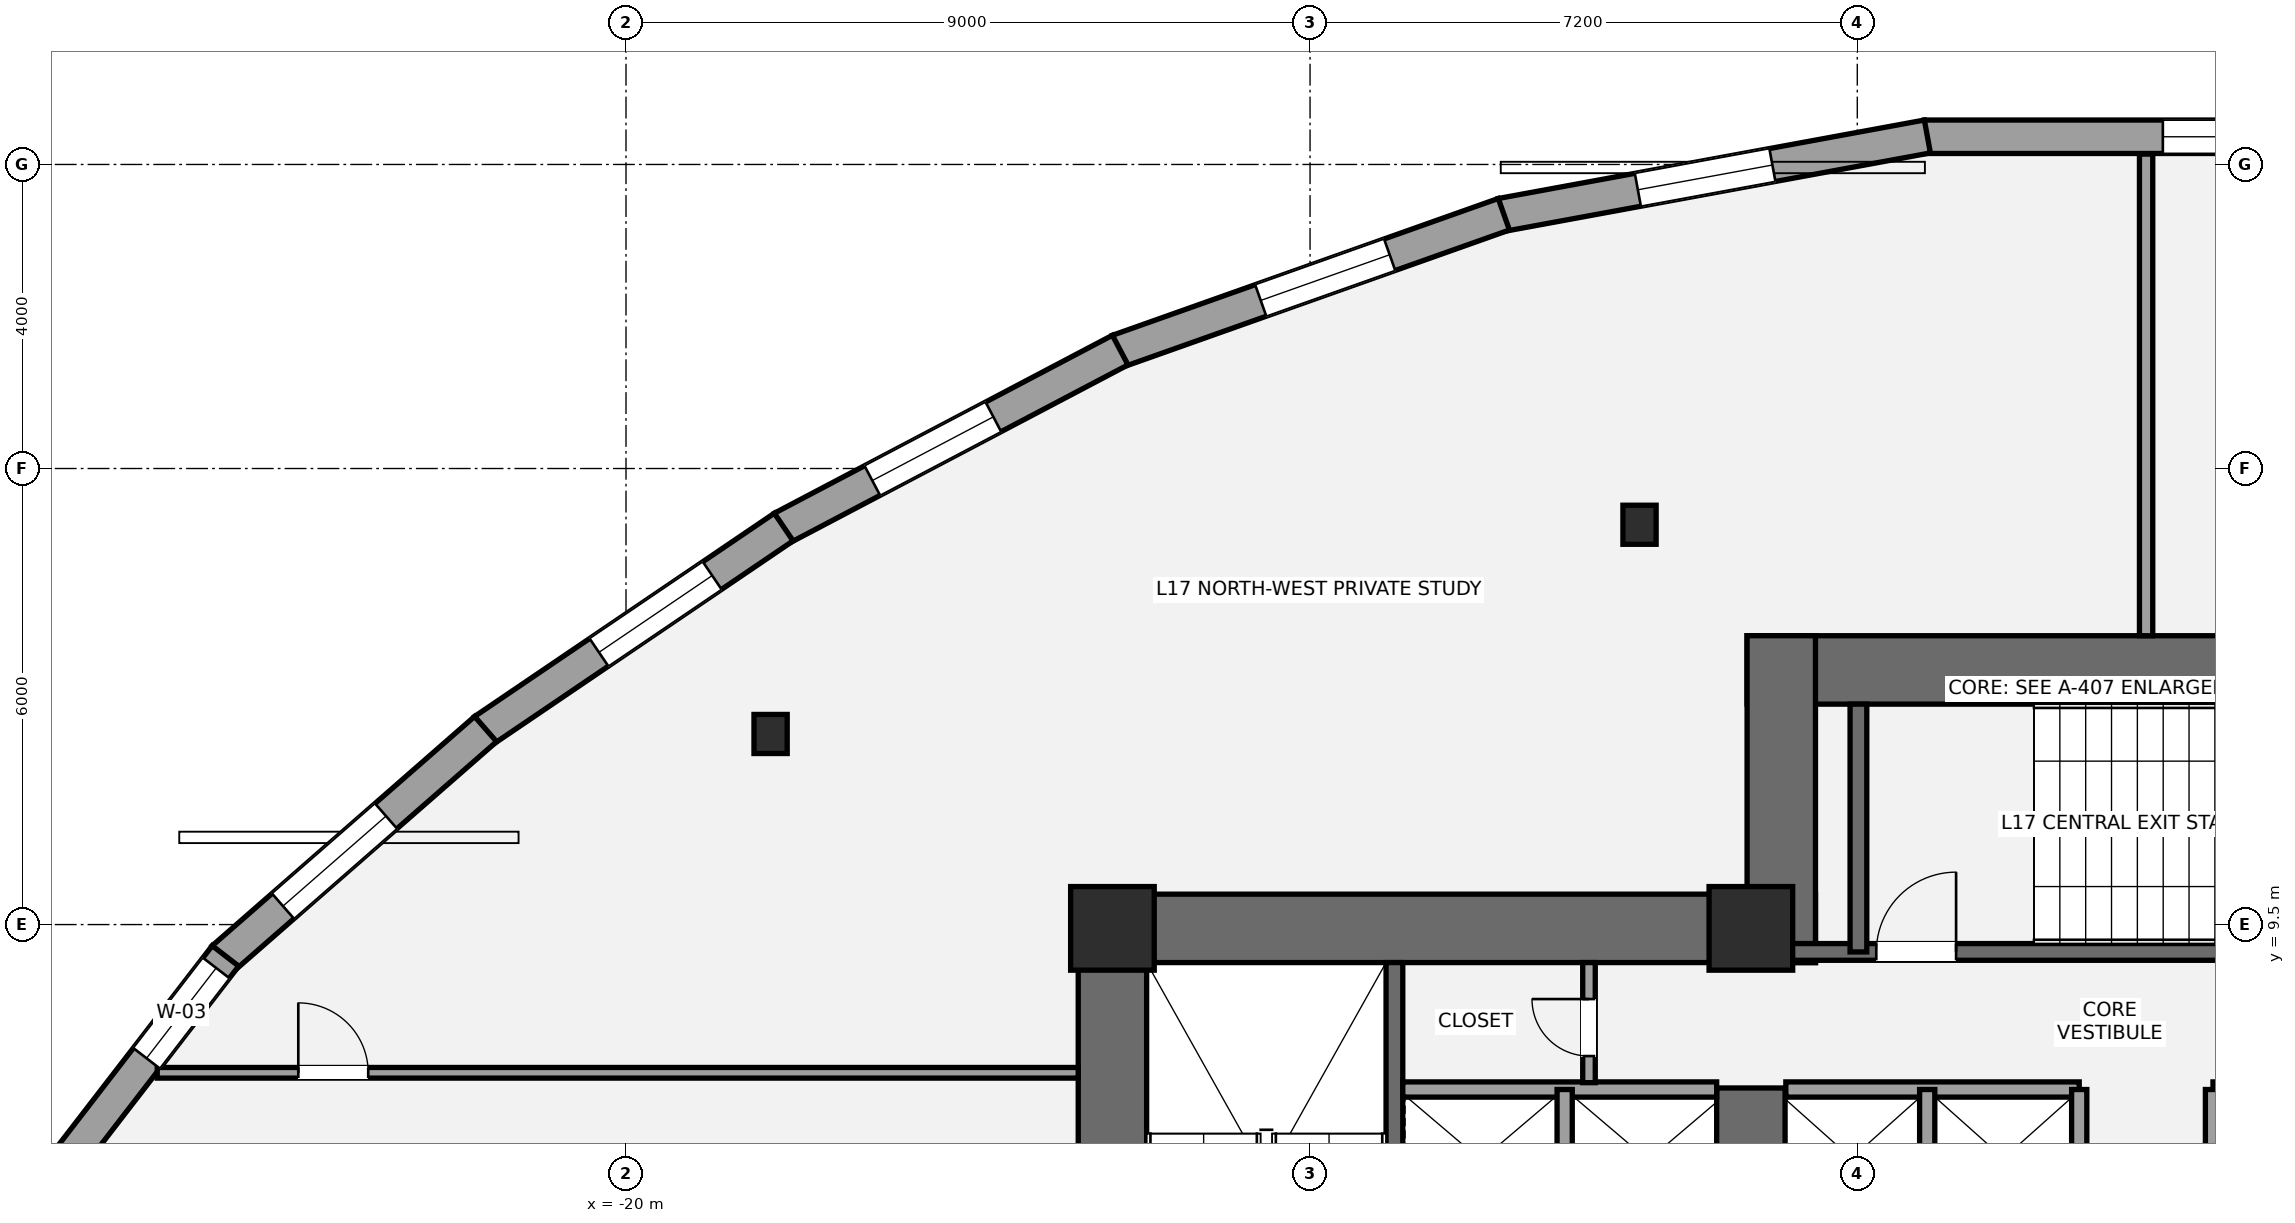
"""IFC4 building model, lengths in metres.
Left out: names, types, materials, properties, quantities, classifications, styles, units other than length and angle.
Written with IfcOpenShell. Run it as: python <this file> out.ifc"""

import sys

from ifc_helpers import new_model, si_unit, direction, frame, frame_2d, origin, origin_2d, place, context, subcontext, project, spatial, rectangle, i_section, extrude, element, fill, save


model = new_model("IFC4")
c1 = context("Model", 3, precision=1e-05, world=origin(), true_north=direction((0.0, 1.0)))
c2 = subcontext(c1, "Body", "Model", "MODEL_VIEW")
j1 = project(units=[si_unit("LENGTHUNIT", "METRE"), si_unit("PLANEANGLEUNIT", "RADIAN")], contexts=[c1])
p1 = place(None, origin())
s1 = spatial("IfcSite", under=j1, at=p1, CompositionType="ELEMENT")
p2 = place(p1, origin())
s2 = spatial("IfcBuilding", under=s1, at=p2, CompositionType="ELEMENT")
p3 = place(p2, frame((0.0, 0.0, 66.6)))
s3 = spatial("IfcBuildingStorey", under=s2, at=p3, CompositionType="ELEMENT", Elevation=66.6)
p4 = place(p3, frame((-13.6, 0.95, 0.0), z_axis=(0.0, 0.0, 1.0), x_axis=(0.0, 1.0, 0.0)))
e1 = element("IfcWall", 1, at=p4, inside=s3, PredefinedType="SHEAR", context=c2, shape_type="SweptSolid", body=[
    extrude(rectangle(XDim=8.95, YDim=0.9, at=frame_2d((4.475, 0.0))), origin(), (0.0, 0.0, 1.0), 3.6),
])
p5 = place(p3, frame((-14.05, 9.45, 0.0), z_axis=(0.0, 0.0, 1.0), x_axis=(1.0, 0.0, 0.0)))
e2 = element("IfcWall", 2, at=p5, inside=s3, PredefinedType="SHEAR", context=c2, shape_type="SweptSolid", body=[
    extrude(rectangle(XDim=9.7, YDim=0.9, at=frame_2d((4.85, 0.0))), origin(), (0.0, 0.0, 1.0), 3.6),
])
p6 = place(p3, frame((-5.2, 5.35, 0.0), z_axis=(0.0, 0.0, 1.0), x_axis=(0.0, 1.0, 0.0)))
e3 = element("IfcWall", 3, at=p6, inside=s3, PredefinedType="SHEAR", context=c2, shape_type="SweptSolid", body=[
    extrude(rectangle(XDim=2.0, YDim=0.9, at=frame_2d((1.0, 0.0))), origin(), (0.0, 0.0, 1.0), 3.6),
])
p7 = place(p3, frame((-9.89, 1.85, 0.0), z_axis=(0.0, 0.0, 1.0), x_axis=(0.0, 1.0, 0.0)))
e4 = element("IfcWall", 4, at=p7, inside=s3, PredefinedType="SHEAR", context=c2, shape_type="SweptSolid", body=[
    extrude(rectangle(XDim=7.15, YDim=0.22, at=frame_2d((3.575, 0.0))), origin(), (0.0, 0.0, 1.0), 3.6),
])
p8 = place(p3, frame((-5.25, 12.85, 0.0), z_axis=(0.0, 0.0, 1.0), x_axis=(1.0, 0.0, 0.0)))
e5 = element("IfcWall", 5, at=p8, inside=s3, PredefinedType="SHEAR", context=c2, shape_type="SweptSolid", body=[
    extrude(rectangle(XDim=10.5, YDim=0.9, at=frame_2d((5.25, 0.0))), origin(), (0.0, 0.0, 1.0), 3.6),
])
p9 = place(p3, frame((-4.8, 9.0, 0.0), z_axis=(0.0, 0.0, 1.0), x_axis=(0.0, 1.0, 0.0)))
e6 = element("IfcWall", 6, at=p9, inside=s3, PredefinedType="SHEAR", context=c2, shape_type="SweptSolid", body=[
    extrude(rectangle(XDim=4.3, YDim=0.9, at=frame_2d((2.15, 0.0))), origin(), (0.0, 0.0, 1.0), 3.6),
])
p10 = place(p3, frame((-4.7, 9.14, 0.0), z_axis=(0.0, 0.0, 1.0), x_axis=(1.0, 0.0, 0.0)))
e7 = element("IfcWall", 7, at=p10, inside=s3, PredefinedType="SHEAR", context=c2, shape_type="SweptSolid", body=[
    extrude(rectangle(XDim=9.3, YDim=0.22, at=frame_2d((4.65, 0.0))), origin(), (0.0, 0.0, 1.0), 3.6),
])
p11 = place(p10, frame((1.15, 0.0, 0.0)))
e8 = element("IfcOpeningElement", 8, at=p11, cuts=e7, PredefinedType="OPENING", context=c2, shape_type="SweptSolid", body=[
    extrude(rectangle(XDim=1.05, YDim=2.15, at=frame_2d((0.525, 1.075))), frame((0.0, 0.12, 0.0), z_axis=(0.0, -1.0, 0.0), x_axis=(1.0, 0.0, 0.0)), (0.0, 0.0, 1.0), 0.24),
])
p12 = place(p3, frame((-3.785, 9.14, 0.0), z_axis=(0.0, 0.0, 1.0), x_axis=(0.0, 1.0, 0.0)))
e9 = element("IfcWall", 9, at=p12, inside=s3, PredefinedType="SHEAR", context=c2, shape_type="SweptSolid", body=[
    extrude(rectangle(XDim=3.26, YDim=0.22, at=frame_2d((1.63, 0.0))), origin(), (0.0, 0.0, 1.0), 3.6),
])
for number, where, z_axis, x_axis in (
    (10, (-13.6, 9.45, 0.0), (0.0, 0.0, 1.0), (1.0, 0.0, 0.0)),
    (11, (-5.2, 9.45, 0.0), (0.0, 0.0, 1.0), (1.0, 0.0, 0.0)),
):
    element("IfcColumn", number, at=place(p3, frame(where, z_axis=z_axis, x_axis=x_axis)), inside=s3, PredefinedType="COLUMN", context=c2, shape_type="SweptSolid", body=[
        extrude(rectangle(XDim=1.1, YDim=1.1, at=origin_2d()), origin(), (0.0, 0.0, 1.0), 3.6),
    ])
for number, where, z_axis, x_axis in (
    (12, (-6.665, 14.76, 0.0), (0.0, 0.0, 1.0), (1.0, 0.0, 0.0)),
    (13, (-18.098, 12.007, 0.0), (0.0, 0.0, 1.0), (1.0, 0.0, 0.0)),
):
    element("IfcColumn", number, at=place(p3, frame(where, z_axis=z_axis, x_axis=x_axis)), inside=s3, PredefinedType="COLUMN", context=c2, shape_type="SweptSolid", body=[
        extrude(i_section(OverallWidth=0.437, OverallDepth=0.514, WebThickness=0.061, FlangeThickness=0.097, at=origin_2d()), origin(), (0.0, 0.0, 1.0), 3.6),
    ])
p13 = place(p3, frame((-2.917, 19.865, 0.0), z_axis=(0.0, 0.0, 1.0), x_axis=(1.0, 0.0, 0.0)))
e14 = element("IfcWall", 14, at=p13, inside=s3, PredefinedType="STANDARD", context=c2, shape_type="SweptSolid", body=[
    extrude(rectangle(XDim=5.835, YDim=0.44, at=frame_2d((2.917, 0.0))), origin(), (0.0, 0.0, 1.0), 2.529),
])
p14 = place(p13, frame((3.138, 0.0, 0.65)))
e15 = element("IfcOpeningElement", 15, at=p14, cuts=e14, PredefinedType="OPENING", context=c2, shape_type="SweptSolid", body=[
    extrude(rectangle(XDim=1.8, YDim=1.7, at=frame_2d((0.9, 0.85))), frame((0.0, 0.23, 0.0), z_axis=(0.0, -1.0, 0.0), x_axis=(1.0, 0.0, 0.0)), (0.0, 0.0, 1.0), 0.46),
])
p15 = place(p3, frame((-8.484, 18.836, 0.0), z_axis=(0.0, 0.0, 1.0), x_axis=(0.983468646836, 0.181078493177, 0.0)))
e16 = element("IfcWall", 16, at=p15, inside=s3, PredefinedType="STANDARD", context=c2, shape_type="SweptSolid", body=[
    extrude(rectangle(XDim=5.7, YDim=0.44, at=frame_2d((2.85, 0.0))), origin(), (0.0, 0.0, 1.0), 2.529),
])
p16 = place(p15, frame((1.827, 0.0, 0.65)))
e17 = element("IfcOpeningElement", 17, at=p16, cuts=e16, PredefinedType="OPENING", context=c2, shape_type="SweptSolid", body=[
    extrude(rectangle(XDim=1.8, YDim=1.7, at=frame_2d((0.9, 0.85))), frame((0.0, 0.23, 0.0), z_axis=(0.0, -1.0, 0.0), x_axis=(1.0, 0.0, 0.0)), (0.0, 0.0, 1.0), 0.46),
])
p17 = place(p3, frame((-13.527, 17.045, 0.0), z_axis=(0.0, 0.0, 1.0), x_axis=(0.942515730584, 0.334161783575, 0.0)))
e18 = element("IfcWall", 18, at=p17, inside=s3, PredefinedType="STANDARD", context=c2, shape_type="SweptSolid", body=[
    extrude(rectangle(XDim=5.386, YDim=0.44, at=frame_2d((2.693, 0.0))), origin(), (0.0, 0.0, 1.0), 2.529),
])
p18 = place(p17, frame((1.992, 0.0, 0.65)))
e19 = element("IfcOpeningElement", 19, at=p18, cuts=e18, PredefinedType="OPENING", context=c2, shape_type="SweptSolid", body=[
    extrude(rectangle(XDim=1.8, YDim=1.7, at=frame_2d((0.9, 0.85))), frame((0.0, 0.23, 0.0), z_axis=(0.0, -1.0, 0.0), x_axis=(1.0, 0.0, 0.0)), (0.0, 0.0, 1.0), 0.46),
])
p19 = place(p3, frame((-17.946, 14.717, 0.0), z_axis=(0.0, 0.0, 1.0), x_axis=(0.884937186938, 0.465710398395, 0.0)))
e20 = element("IfcWall", 20, at=p19, inside=s3, PredefinedType="STANDARD", context=c2, shape_type="SweptSolid", body=[
    extrude(rectangle(XDim=5.026, YDim=0.44, at=frame_2d((2.513, 0.0))), origin(), (0.0, 0.0, 1.0), 2.529),
])
p20 = place(p19, frame((1.341, 0.0, 0.65)))
e21 = element("IfcOpeningElement", 21, at=p20, cuts=e20, PredefinedType="OPENING", context=c2, shape_type="SweptSolid", body=[
    extrude(rectangle(XDim=1.8, YDim=1.7, at=frame_2d((0.9, 0.85))), frame((0.0, 0.23, 0.0), z_axis=(0.0, -1.0, 0.0), x_axis=(1.0, 0.0, 0.0)), (0.0, 0.0, 1.0), 0.46),
])
p21 = place(p3, frame((-21.868, 12.056, 0.0), z_axis=(0.0, 0.0, 1.0), x_axis=(0.827689135004, 0.561186863528, 0.0)))
e22 = element("IfcWall", 22, at=p21, inside=s3, PredefinedType="STANDARD", context=c2, shape_type="SweptSolid", body=[
    extrude(rectangle(XDim=4.765, YDim=0.44, at=frame_2d((2.382, 0.0))), origin(), (0.0, 0.0, 1.0), 2.529),
])
p22 = place(p21, frame((1.828, 0.0, 0.65)))
e23 = element("IfcOpeningElement", 23, at=p22, cuts=e22, PredefinedType="OPENING", context=c2, shape_type="SweptSolid", body=[
    extrude(rectangle(XDim=1.8, YDim=1.7, at=frame_2d((0.9, 0.85))), frame((0.0, 0.23, 0.0), z_axis=(0.0, -1.0, 0.0), x_axis=(1.0, 0.0, 0.0)), (0.0, 0.0, 1.0), 0.46),
])
p23 = place(p3, frame((-25.3, 9.056, 0.0), z_axis=(0.0, 0.0, 1.0), x_axis=(0.753064762529, 0.657946398605, 0.0)))
e24 = element("IfcWall", 24, at=p23, inside=s3, PredefinedType="STANDARD", context=c2, shape_type="SweptSolid", body=[
    extrude(rectangle(XDim=4.584, YDim=0.44, at=frame_2d((2.292, 0.0))), origin(), (0.0, 0.0, 1.0), 2.529),
])
p24 = place(p23, frame((1.044, 0.0, 0.65)))
e25 = element("IfcOpeningElement", 25, at=p24, cuts=e24, PredefinedType="OPENING", context=c2, shape_type="SweptSolid", body=[
    extrude(rectangle(XDim=1.8, YDim=1.7, at=frame_2d((0.9, 0.85))), frame((0.0, 0.23, 0.0), z_axis=(0.0, -1.0, 0.0), x_axis=(1.0, 0.0, 0.0)), (0.0, 0.0, 1.0), 0.46),
])
p25 = place(p3, frame((-27.925, 5.645, 0.0), z_axis=(0.0, 0.0, 1.0), x_axis=(0.610684735824, 0.791873824187, 0.0)))
e26 = element("IfcWall", 26, at=p25, inside=s3, PredefinedType="STANDARD", context=c2, shape_type="SweptSolid", body=[
    extrude(rectangle(XDim=4.347, YDim=0.44, at=frame_2d((2.173, 0.0))), origin(), (0.0, 0.0, 1.0), 2.529),
])
p26 = place(p25, frame((2.647, 0.0, 0.65)))
e27 = element("IfcOpeningElement", 27, at=p26, cuts=e26, PredefinedType="OPENING", context=c2, shape_type="SweptSolid", body=[
    extrude(rectangle(XDim=1.5, YDim=1.7, at=frame_2d((0.75, 0.85))), frame((0.0, 0.23, 0.0), z_axis=(0.0, -1.0, 0.0), x_axis=(1.0, 0.0, 0.0)), (0.0, 0.0, 1.0), 0.46),
])
p27 = place(p3, frame((-9.78, 7.33, 0.0), z_axis=(0.0, 0.0, 1.0), x_axis=(1.0, 0.0, 0.0)))
e28 = element("IfcWall", 28, at=p27, inside=s3, PredefinedType="SOLIDWALL", context=c2, shape_type="SweptSolid", body=[
    extrude(rectangle(XDim=4.13, YDim=0.2, at=frame_2d((2.065, 0.0))), origin(), (0.0, 0.0, 1.0), 3.4),
])
p28 = place(p3, frame((-7.65, 5.47, 0.0), z_axis=(0.0, 0.0, 1.0), x_axis=(0.0, 1.0, 0.0)))
e29 = element("IfcWall", 29, at=p28, inside=s3, PredefinedType="SOLIDWALL", context=c2, shape_type="SweptSolid", body=[
    extrude(rectangle(XDim=1.86, YDim=0.2, at=frame_2d((0.93, 0.0))), origin(), (0.0, 0.0, 1.0), 3.4),
])
for number, where, z_axis, x_axis in (
    (30, (-4.74, 7.33, 0.0), (0.0, 0.0, 1.0), (1.0, 0.0, 0.0)),
    (31, (0.88, 7.33, 0.0), (0.0, 0.0, 1.0), (1.0, 0.0, 0.0)),
):
    element("IfcWall", number, at=place(p3, frame(where, z_axis=z_axis, x_axis=x_axis)), inside=s3, PredefinedType="SOLIDWALL", context=c2, shape_type="SweptSolid", body=[
        extrude(rectangle(XDim=3.86, YDim=0.2, at=frame_2d((1.93, 0.0))), origin(), (0.0, 0.0, 1.0), 3.4),
    ])
for number, where, z_axis, x_axis in (
    (32, (-2.88, 5.52, 0.0), (0.0, 0.0, 1.0), (0.0, 1.0, 0.0)),
    (33, (-0.88, 5.52, 0.0), (0.0, 0.0, 1.0), (0.0, 1.0, 0.0)),
    (34, (0.88, 5.52, 0.0), (0.0, 0.0, 1.0), (0.0, 1.0, 0.0)),
):
    element("IfcWall", number, at=place(p3, frame(where, z_axis=z_axis, x_axis=x_axis)), inside=s3, PredefinedType="SOLIDWALL", context=c2, shape_type="SweptSolid", body=[
        extrude(rectangle(XDim=1.81, YDim=0.2, at=frame_2d((0.905, 0.0))), origin(), (0.0, 0.0, 1.0), 3.4),
    ])
p29 = place(p3, frame((-7.33, 7.42, 0.0), z_axis=(0.0, 0.0, 1.0), x_axis=(0.0, 1.0, 0.0)))
e35 = element("IfcWall", 35, at=p29, inside=s3, PredefinedType="PARTITIONING", context=c2, shape_type="SweptSolid", body=[
    extrude(rectangle(XDim=1.58, YDim=0.165, at=frame_2d((0.79, 0.0))), origin(), (0.0, 0.0, 1.0), 3.4),
])
p30 = place(p29, frame((0.35, 0.0, 0.0)))
e36 = element("IfcOpeningElement", 36, at=p30, cuts=e35, PredefinedType="OPENING", context=c2, shape_type="SweptSolid", body=[
    extrude(rectangle(XDim=0.75, YDim=2.1, at=frame_2d((0.375, 1.05))), frame((0.0, 0.093, 0.0), z_axis=(0.0, -1.0, 0.0), x_axis=(1.0, 0.0, 0.0)), (0.0, 0.0, 1.0), 0.185),
])
p31 = place(p3, frame((-26.168, 7.55, 0.0), z_axis=(0.0, 0.0, 1.0), x_axis=(1.0, 0.0, 0.0)))
e37 = element("IfcWall", 37, at=p31, inside=s3, PredefinedType="PARTITIONING", context=c2, shape_type="SweptSolid", body=[
    extrude(rectangle(XDim=12.118, YDim=0.14, at=frame_2d((6.059, 0.0))), origin(), (0.0, 0.0, 1.0), 3.4),
])
p32 = place(p31, frame((1.856, 0.0, 0.0)))
e38 = element("IfcOpeningElement", 38, at=p32, cuts=e37, PredefinedType="OPENING", context=c2, shape_type="SweptSolid", body=[
    extrude(rectangle(XDim=0.92, YDim=2.15, at=frame_2d((0.46, 1.075))), frame((0.0, 0.08, 0.0), z_axis=(0.0, -1.0, 0.0), x_axis=(1.0, 0.0, 0.0)), (0.0, 0.0, 1.0), 0.16),
])
p33 = place(p3, frame((0.0, 13.3, 0.0), z_axis=(0.0, 0.0, 1.0), x_axis=(0.0, 1.0, 0.0)))
e39 = element("IfcWall", 39, at=p33, inside=s3, PredefinedType="PARTITIONING", context=c2, shape_type="SweptSolid", body=[
    extrude(rectangle(XDim=6.336, YDim=0.175, at=frame_2d((3.168, 0.0))), origin(), (0.0, 0.0, 1.0), 3.4),
])
p34 = place(p14, origin())
e40 = element("IfcWindow", 40, at=p34, inside=s3, PartitioningType="SINGLE_PANEL", PredefinedType="WINDOW", context=c2, shape_type="SweptSolid", body=[
    extrude(rectangle(XDim=1.8, YDim=1.7, at=frame_2d((0.9, 0.85))), frame((0.0, -0.01, 0.0), z_axis=(0.0, -1.0, 0.0), x_axis=(1.0, 0.0, 0.0)), (0.0, 0.0, 1.0), 0.06),
])
fill(e15, e40)
p35 = place(p16, origin())
e41 = element("IfcWindow", 41, at=p35, inside=s3, PartitioningType="SINGLE_PANEL", PredefinedType="WINDOW", context=c2, shape_type="SweptSolid", body=[
    extrude(rectangle(XDim=1.8, YDim=1.7, at=frame_2d((0.9, 0.85))), frame((0.0, -0.01, 0.0), z_axis=(0.0, -1.0, 0.0), x_axis=(1.0, 0.0, 0.0)), (0.0, 0.0, 1.0), 0.06),
])
fill(e17, e41)
p36 = place(p18, origin())
e42 = element("IfcWindow", 42, at=p36, inside=s3, PartitioningType="SINGLE_PANEL", PredefinedType="WINDOW", context=c2, shape_type="SweptSolid", body=[
    extrude(rectangle(XDim=1.8, YDim=1.7, at=frame_2d((0.9, 0.85))), frame((0.0, -0.01, 0.0), z_axis=(0.0, -1.0, 0.0), x_axis=(1.0, 0.0, 0.0)), (0.0, 0.0, 1.0), 0.06),
])
fill(e19, e42)
p37 = place(p20, origin())
e43 = element("IfcWindow", 43, at=p37, inside=s3, PartitioningType="SINGLE_PANEL", PredefinedType="WINDOW", context=c2, shape_type="SweptSolid", body=[
    extrude(rectangle(XDim=1.8, YDim=1.7, at=frame_2d((0.9, 0.85))), frame((0.0, -0.01, 0.0), z_axis=(0.0, -1.0, 0.0), x_axis=(1.0, 0.0, 0.0)), (0.0, 0.0, 1.0), 0.06),
])
fill(e21, e43)
p38 = place(p22, origin())
e44 = element("IfcWindow", 44, at=p38, inside=s3, PartitioningType="SINGLE_PANEL", PredefinedType="WINDOW", context=c2, shape_type="SweptSolid", body=[
    extrude(rectangle(XDim=1.8, YDim=1.7, at=frame_2d((0.9, 0.85))), frame((0.0, -0.01, 0.0), z_axis=(0.0, -1.0, 0.0), x_axis=(1.0, 0.0, 0.0)), (0.0, 0.0, 1.0), 0.06),
])
fill(e23, e44)
p39 = place(p24, origin())
e45 = element("IfcWindow", 45, at=p39, inside=s3, PartitioningType="SINGLE_PANEL", PredefinedType="WINDOW", context=c2, shape_type="SweptSolid", body=[
    extrude(rectangle(XDim=1.8, YDim=1.7, at=frame_2d((0.9, 0.85))), frame((0.0, -0.01, 0.0), z_axis=(0.0, -1.0, 0.0), x_axis=(1.0, 0.0, 0.0)), (0.0, 0.0, 1.0), 0.06),
])
fill(e25, e45)
p40 = place(p26, origin())
e46 = element("IfcWindow", 46, at=p40, inside=s3, PartitioningType="SINGLE_PANEL", PredefinedType="WINDOW", context=c2, shape_type="SweptSolid", body=[
    extrude(rectangle(XDim=1.5, YDim=1.7, at=frame_2d((0.75, 0.85))), frame((0.0, -0.01, 0.0), z_axis=(0.0, -1.0, 0.0), x_axis=(1.0, 0.0, 0.0)), (0.0, 0.0, 1.0), 0.06),
])
fill(e27, e46)
p41 = place(p11, origin())
e47 = element("IfcDoor", 47, at=p41, inside=s3, OperationType="SINGLE_SWING_RIGHT", PredefinedType="DOOR", context=c2, shape_type="SweptSolid", body=[
    extrude(rectangle(XDim=1.05, YDim=2.15, at=frame_2d((0.525, 1.075))), frame((0.0, 0.025, 0.0), z_axis=(0.0, -1.0, 0.0), x_axis=(1.0, 0.0, 0.0)), (0.0, 0.0, 1.0), 0.05),
])
fill(e8, e47)
p42 = place(p30, origin())
e48 = element("IfcDoor", 48, at=p42, inside=s3, OperationType="SINGLE_SWING_RIGHT", PredefinedType="DOOR", context=c2, shape_type="SweptSolid", body=[
    extrude(rectangle(XDim=0.75, YDim=2.1, at=frame_2d((0.375, 1.05))), frame((0.0, 0.025, 0.0), z_axis=(0.0, -1.0, 0.0), x_axis=(1.0, 0.0, 0.0)), (0.0, 0.0, 1.0), 0.05),
])
fill(e36, e48)
p43 = place(p32, origin())
e49 = element("IfcDoor", 49, at=p43, inside=s3, OperationType="SINGLE_SWING_LEFT", PredefinedType="DOOR", context=c2, shape_type="SweptSolid", body=[
    extrude(rectangle(XDim=0.92, YDim=2.15, at=frame_2d((0.46, 1.075))), frame((0.0, 0.025, 0.0), z_axis=(0.0, -1.0, 0.0), x_axis=(1.0, 0.0, 0.0)), (0.0, 0.0, 1.0), 0.05),
])
fill(e38, e49)
save(model, sys.argv[1])
